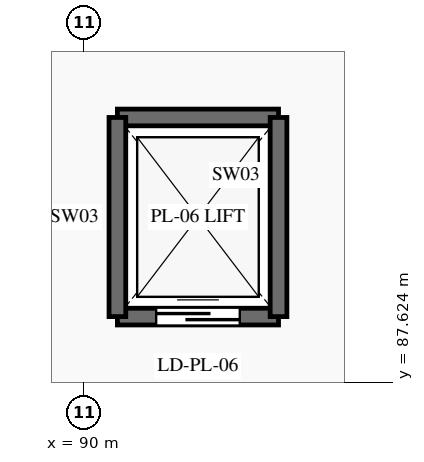
"""IFC4 building model, lengths in metres.
Left out: names, types, materials, properties, quantities, classifications, styles, units other than length and angle.
Written with IfcOpenShell. Run it as: python <this file> out.ifc"""

import sys

from ifc_helpers import new_model, si_unit, direction, frame, frame_2d, origin, place, context, subcontext, project, spatial, rectangle, extrude, element, fill, save


model = new_model("IFC4")
c1 = context("Model", 3, precision=1e-05, world=origin(), true_north=direction((0.0, 1.0)))
c2 = subcontext(c1, "Body", "Model", "MODEL_VIEW")
j1 = project(units=[si_unit("LENGTHUNIT", "METRE"), si_unit("PLANEANGLEUNIT", "RADIAN")], contexts=[c1])
p1 = place(None, origin())
s1 = spatial("IfcSite", under=j1, at=p1, CompositionType="ELEMENT")
p2 = place(p1, origin())
s2 = spatial("IfcBuilding", under=s1, at=p2, CompositionType="ELEMENT")
p3 = place(p2, origin())
s3 = spatial("IfcBuildingStorey", under=s2, at=p3, CompositionType="ELEMENT", Elevation=0.0)
p4 = place(p3, frame((90.44, 88.49, 0.0), z_axis=(0.0, 0.0, 1.0), x_axis=(1.0, 0.0, 0.0)))
e1 = element("IfcWall", 1, at=p4, inside=s3, PredefinedType="SHEAR", context=c2, shape_type="SweptSolid", body=[
    extrude(rectangle(XDim=2.12, YDim=0.22, at=frame_2d((1.06, 0.0))), origin(), (0.0, 0.0, 1.0), 6.0),
])
p5 = place(p4, frame((0.51, 0.0, 0.0)))
e2 = element("IfcOpeningElement", 2, at=p5, cuts=e1, PredefinedType="OPENING", context=c2, shape_type="SweptSolid", body=[
    extrude(rectangle(XDim=1.1, YDim=2.15, at=frame_2d((0.55, 1.075))), frame((0.0, 0.125, 0.0), z_axis=(0.0, -1.0, 0.0), x_axis=(1.0, 0.0, 0.0)), (0.0, 0.0, 1.0), 0.25),
])
p6 = place(p3, frame((90.44, 91.11, 0.0), z_axis=(0.0, 0.0, 1.0), x_axis=(1.0, 0.0, 0.0)))
e3 = element("IfcWall", 3, at=p6, inside=s3, PredefinedType="SHEAR", context=c2, shape_type="SweptSolid", body=[
    extrude(rectangle(XDim=2.12, YDim=0.22, at=frame_2d((1.06, 0.0))), origin(), (0.0, 0.0, 1.0), 6.0),
])
for number, where, z_axis, x_axis in (
    (4, (90.44, 88.49, 0.0), (0.0, 0.0, 1.0), (0.0, 1.0, 0.0)),
    (5, (92.56, 88.49, 0.0), (0.0, 0.0, 1.0), (0.0, 1.0, 0.0)),
):
    element("IfcWall", number, at=place(p3, frame(where, z_axis=z_axis, x_axis=x_axis)), inside=s3, PredefinedType="SHEAR", context=c2, shape_type="SweptSolid", body=[
        extrude(rectangle(XDim=2.62, YDim=0.22, at=frame_2d((1.31, 0.0))), origin(), (0.0, 0.0, 1.0), 6.0),
    ])
p7 = place(p5, origin())
e6 = element("IfcDoor", 6, at=p7, inside=s3, OperationType="SLIDING_TO_LEFT", PredefinedType="DOOR", context=c2, shape_type="SweptSolid", body=[
    extrude(rectangle(XDim=1.1, YDim=2.15, at=frame_2d((0.55, 1.075))), frame((0.0, 0.025, 0.0), z_axis=(0.0, -1.0, 0.0), x_axis=(1.0, 0.0, 0.0)), (0.0, 0.0, 1.0), 0.05),
])
fill(e2, e6)
save(model, sys.argv[1])
